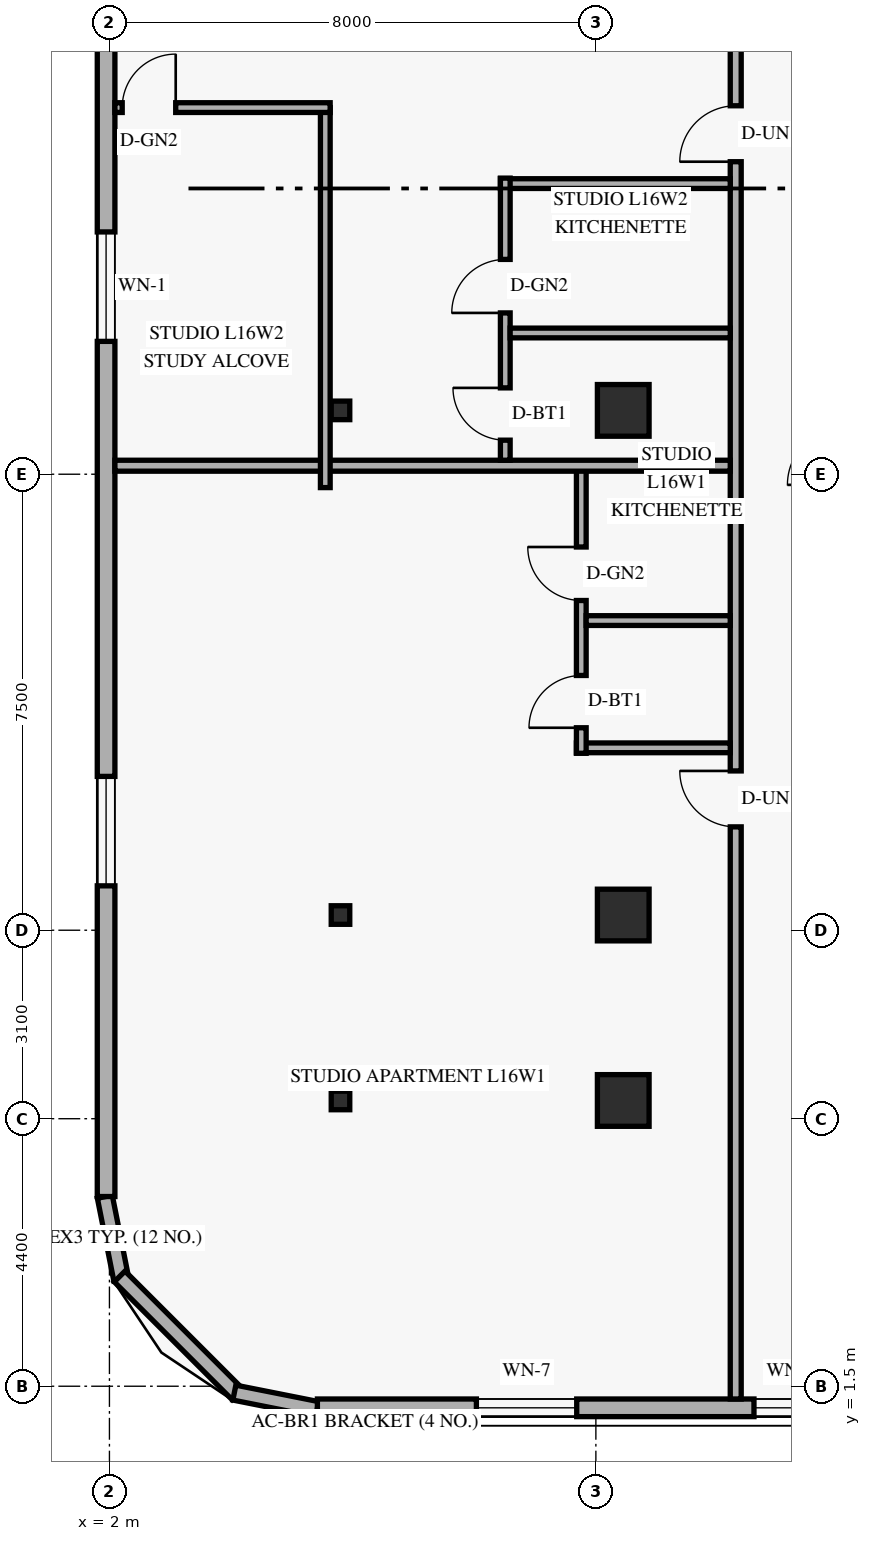
"""IFC4 building model, lengths in metres.
Left out: names, types, materials, properties, quantities, classifications, styles, units other than length and angle.
Written with IfcOpenShell. Run it as: python <this file> out.ifc"""

import sys

from ifc_helpers import new_model, si_unit, direction, frame, frame_2d, origin, origin_2d, place, context, subcontext, project, spatial, rectangle, hollow_rectangle, extrude, element, fill, save


model = new_model("IFC4")
c1 = context("Model", 3, precision=1e-05, world=origin(), true_north=direction((0.0, 1.0)))
c2 = subcontext(c1, "Body", "Model", "MODEL_VIEW")
j1 = project(units=[si_unit("LENGTHUNIT", "METRE"), si_unit("PLANEANGLEUNIT", "RADIAN")], contexts=[c1])
p1 = place(None, origin())
s1 = spatial("IfcSite", under=j1, at=p1, CompositionType="ELEMENT")
p2 = place(p1, origin())
s2 = spatial("IfcBuilding", under=s1, at=p2, CompositionType="ELEMENT")
p3 = place(p2, frame((0.0, 0.0, 64.2)))
s3 = spatial("IfcBuildingStorey", under=s2, at=p3, CompositionType="ELEMENT", Elevation=64.2)
for number, where, z_axis, x_axis in (
    (1, (5.8, 6.2, 0.0), (0.0, 0.0, 1.0), (1.0, 0.0, 0.0)),
    (2, (5.8, 9.25, 0.0), (0.0, 0.0, 1.0), (1.0, 0.0, 0.0)),
    (3, (5.8, 17.55, 0.0), (0.0, 0.0, 1.0), (1.0, 0.0, 0.0)),
):
    element("IfcColumn", number, at=place(p3, frame(where, z_axis=z_axis, x_axis=x_axis)), inside=s3, PredefinedType="COLUMN", context=c2, shape_type="SweptSolid", body=[
        extrude(hollow_rectangle(XDim=0.305, YDim=0.305, WallThickness=0.013, at=origin_2d()), origin(), (0.0, 0.0, 1.0), 3.6),
    ])
for number, where, z_axis, x_axis in (
    (4, (10.45, 6.2, 0.0), (0.0, 0.0, 1.0), (1.0, 0.0, 0.0)),
    (5, (10.45, 9.25, 0.0), (0.0, 0.0, 1.0), (1.0, 0.0, 0.0)),
    (6, (10.45, 17.55, 0.0), (0.0, 0.0, 1.0), (1.0, 0.0, 0.0)),
):
    element("IfcColumn", number, at=place(p3, frame(where, z_axis=z_axis, x_axis=x_axis)), inside=s3, PredefinedType="COLUMN", context=c2, shape_type="SweptSolid", body=[
        extrude(rectangle(XDim=0.85, YDim=0.85, at=origin_2d()), origin(), (0.0, 0.0, 1.0), 3.6),
    ])
p4 = place(p3, frame((1.924, 4.616, 0.0), z_axis=(0.0, 0.0, 1.0), x_axis=(0.19496651342, -0.980809899341, 0.0)))
e7 = element("IfcWall", 7, at=p4, inside=s3, PredefinedType="SOLIDWALL", context=c2, shape_type="SweptSolid", body=[
    extrude(rectangle(XDim=1.389, YDim=0.25, at=frame_2d((0.694, 0.0))), origin(), (0.0, 0.0, 1.0), 3.36),
])
p5 = place(p3, frame((2.168, 3.305, 0.0), z_axis=(0.0, 0.0, 1.0), x_axis=(0.707106781187, -0.707106781187, 0.0)))
e8 = element("IfcWall", 8, at=p5, inside=s3, PredefinedType="SOLIDWALL", context=c2, shape_type="SweptSolid", body=[
    extrude(rectangle(XDim=2.739, YDim=0.25, at=frame_2d((1.37, 0.0))), origin(), (0.0, 0.0, 1.0), 3.36),
])
p6 = place(p3, frame((4.054, 1.395, 0.0), z_axis=(0.0, 0.0, 1.0), x_axis=(0.980809899341, -0.19496651342, 0.0)))
e9 = element("IfcWall", 9, at=p6, inside=s3, PredefinedType="SOLIDWALL", context=c2, shape_type="SweptSolid", body=[
    extrude(rectangle(XDim=1.389, YDim=0.25, at=frame_2d((0.694, 0.0))), origin(), (0.0, 0.0, 1.0), 3.36),
])
p7 = place(p3, frame((5.42, 1.145, 0.0), z_axis=(0.0, 0.0, 1.0), x_axis=(1.0, 0.0, 0.0)))
e10 = element("IfcWall", 10, at=p7, inside=s3, PredefinedType="SOLIDWALL", context=c2, shape_type="SweptSolid", body=[
    extrude(rectangle(XDim=39.56, YDim=0.29, at=frame_2d((19.78, 0.0))), origin(), (0.0, 0.0, 1.0), 3.36),
])
p8 = place(p7, frame((2.615, 0.0, 0.85)))
e11 = element("IfcOpeningElement", 11, at=p8, cuts=e10, PredefinedType="OPENING", context=c2, shape_type="SweptSolid", body=[
    extrude(rectangle(XDim=1.65, YDim=1.6, at=frame_2d((0.825, 0.8))), frame((0.0, 0.155, 0.0), z_axis=(0.0, -1.0, 0.0), x_axis=(1.0, 0.0, 0.0)), (0.0, 0.0, 1.0), 0.31),
])
p9 = place(p7, frame((7.18, 0.0, 0.85)))
e12 = element("IfcOpeningElement", 12, at=p9, cuts=e10, PredefinedType="OPENING", context=c2, shape_type="SweptSolid", body=[
    extrude(rectangle(XDim=1.2, YDim=1.5, at=frame_2d((0.6, 0.75))), frame((0.0, 0.155, 0.0), z_axis=(0.0, -1.0, 0.0), x_axis=(1.0, 0.0, 0.0)), (0.0, 0.0, 1.0), 0.31),
])
p10 = place(p7, frame((11.906, 0.0, 0.85)))
e13 = element("IfcOpeningElement", 13, at=p10, cuts=e10, PredefinedType="OPENING", context=c2, shape_type="SweptSolid", body=[
    extrude(rectangle(XDim=1.65, YDim=1.6, at=frame_2d((0.825, 0.8))), frame((0.0, 0.155, 0.0), z_axis=(0.0, -1.0, 0.0), x_axis=(1.0, 0.0, 0.0)), (0.0, 0.0, 1.0), 0.31),
])
p11 = place(p7, frame((18.515, 0.0, 0.85)))
e14 = element("IfcOpeningElement", 14, at=p11, cuts=e10, PredefinedType="OPENING", context=c2, shape_type="SweptSolid", body=[
    extrude(rectangle(XDim=1.65, YDim=1.6, at=frame_2d((0.825, 0.8))), frame((0.0, 0.155, 0.0), z_axis=(0.0, -1.0, 0.0), x_axis=(1.0, 0.0, 0.0)), (0.0, 0.0, 1.0), 0.31),
])
p12 = place(p7, frame((25.124, 0.0, 0.85)))
e15 = element("IfcOpeningElement", 15, at=p12, cuts=e10, PredefinedType="OPENING", context=c2, shape_type="SweptSolid", body=[
    extrude(rectangle(XDim=1.65, YDim=1.6, at=frame_2d((0.825, 0.8))), frame((0.0, 0.155, 0.0), z_axis=(0.0, -1.0, 0.0), x_axis=(1.0, 0.0, 0.0)), (0.0, 0.0, 1.0), 0.31),
])
p13 = place(p7, frame((30.465, 0.0, 0.85)))
e16 = element("IfcOpeningElement", 16, at=p13, cuts=e10, PredefinedType="OPENING", context=c2, shape_type="SweptSolid", body=[
    extrude(rectangle(XDim=1.2, YDim=1.5, at=frame_2d((0.6, 0.75))), frame((0.0, 0.155, 0.0), z_axis=(0.0, -1.0, 0.0), x_axis=(1.0, 0.0, 0.0)), (0.0, 0.0, 1.0), 0.31),
])
p14 = place(p7, frame((35.02, 0.0, 0.85)))
e17 = element("IfcOpeningElement", 17, at=p14, cuts=e10, PredefinedType="OPENING", context=c2, shape_type="SweptSolid", body=[
    extrude(rectangle(XDim=1.65, YDim=1.6, at=frame_2d((0.825, 0.8))), frame((0.0, 0.155, 0.0), z_axis=(0.0, -1.0, 0.0), x_axis=(1.0, 0.0, 0.0)), (0.0, 0.0, 1.0), 0.31),
])
p15 = place(p3, frame((1.945, 43.38, 0.0), z_axis=(0.0, 0.0, 1.0), x_axis=(0.0, -1.0, 0.0)))
e18 = element("IfcWall", 18, at=p15, inside=s3, PredefinedType="SOLIDWALL", context=c2, shape_type="SweptSolid", body=[
    extrude(rectangle(XDim=38.76, YDim=0.29, at=frame_2d((19.38, 0.0))), origin(), (0.0, 0.0, 1.0), 3.36),
])
p16 = place(p15, frame((31.85, 0.0, 0.85)))
e19 = element("IfcOpeningElement", 19, at=p16, cuts=e18, PredefinedType="OPENING", context=c2, shape_type="SweptSolid", body=[
    extrude(rectangle(XDim=1.8, YDim=1.6, at=frame_2d((0.9, 0.8))), frame((0.0, 0.155, 0.0), z_axis=(0.0, -1.0, 0.0), x_axis=(1.0, 0.0, 0.0)), (0.0, 0.0, 1.0), 0.31),
])
p17 = place(p15, frame((22.895, 0.0, 0.85)))
e20 = element("IfcOpeningElement", 20, at=p17, cuts=e18, PredefinedType="OPENING", context=c2, shape_type="SweptSolid", body=[
    extrude(rectangle(XDim=1.8, YDim=1.6, at=frame_2d((0.9, 0.8))), frame((0.0, 0.155, 0.0), z_axis=(0.0, -1.0, 0.0), x_axis=(1.0, 0.0, 0.0)), (0.0, 0.0, 1.0), 0.31),
])
p18 = place(p15, frame((15.075, 0.0, 0.85)))
e21 = element("IfcOpeningElement", 21, at=p18, cuts=e18, PredefinedType="OPENING", context=c2, shape_type="SweptSolid", body=[
    extrude(rectangle(XDim=1.8, YDim=1.6, at=frame_2d((0.9, 0.8))), frame((0.0, 0.155, 0.0), z_axis=(0.0, -1.0, 0.0), x_axis=(1.0, 0.0, 0.0)), (0.0, 0.0, 1.0), 0.31),
])
p19 = place(p15, frame((7.255, 0.0, 0.85)))
e22 = element("IfcOpeningElement", 22, at=p19, cuts=e18, PredefinedType="OPENING", context=c2, shape_type="SweptSolid", body=[
    extrude(rectangle(XDim=1.8, YDim=1.6, at=frame_2d((0.9, 0.8))), frame((0.0, 0.155, 0.0), z_axis=(0.0, -1.0, 0.0), x_axis=(1.0, 0.0, 0.0)), (0.0, 0.0, 1.0), 0.31),
])
p20 = place(p15, frame((1.705, 0.0, 0.85)))
e23 = element("IfcOpeningElement", 23, at=p20, cuts=e18, PredefinedType="OPENING", context=c2, shape_type="SweptSolid", body=[
    extrude(rectangle(XDim=1.8, YDim=1.6, at=frame_2d((0.9, 0.8))), frame((0.0, 0.155, 0.0), z_axis=(0.0, -1.0, 0.0), x_axis=(1.0, 0.0, 0.0)), (0.0, 0.0, 1.0), 0.31),
])
p21 = place(p3, frame((12.3, 1.29, 0.0), z_axis=(0.0, 0.0, 1.0), x_axis=(0.0, 1.0, 0.0)))
e24 = element("IfcWall", 24, at=p21, inside=s3, PredefinedType="STANDARD", context=c2, shape_type="SweptSolid", body=[
    extrude(rectangle(XDim=45.42, YDim=0.18, at=frame_2d((22.71, 0.0))), origin(), (0.0, 0.0, 1.0), 2.649),
])
p22 = place(p21, frame((9.41, 0.0, 0.0)))
e25 = element("IfcOpeningElement", 25, at=p22, cuts=e24, PredefinedType="OPENING", context=c2, shape_type="SweptSolid", body=[
    extrude(rectangle(XDim=0.92, YDim=2.15, at=frame_2d((0.46, 1.075))), frame((0.0, 0.1, 0.0), z_axis=(0.0, -1.0, 0.0), x_axis=(1.0, 0.0, 0.0)), (0.0, 0.0, 1.0), 0.2),
])
p23 = place(p21, frame((20.35, 0.0, 0.0)))
e26 = element("IfcOpeningElement", 26, at=p23, cuts=e24, PredefinedType="OPENING", context=c2, shape_type="SweptSolid", body=[
    extrude(rectangle(XDim=0.92, YDim=2.15, at=frame_2d((0.46, 1.075))), frame((0.0, 0.1, 0.0), z_axis=(0.0, -1.0, 0.0), x_axis=(1.0, 0.0, 0.0)), (0.0, 0.0, 1.0), 0.2),
])
p24 = place(p21, frame((35.99, 0.0, 0.0)))
e27 = element("IfcOpeningElement", 27, at=p24, cuts=e24, PredefinedType="OPENING", context=c2, shape_type="SweptSolid", body=[
    extrude(rectangle(XDim=0.92, YDim=2.15, at=frame_2d((0.46, 1.075))), frame((0.0, 0.1, 0.0), z_axis=(0.0, -1.0, 0.0), x_axis=(1.0, 0.0, 0.0)), (0.0, 0.0, 1.0), 0.2),
])
p25 = place(p3, frame((9.68, 12.0, 0.0), z_axis=(0.0, 0.0, 1.0), x_axis=(1.0, 0.0, 0.0)))
e28 = element("IfcWall", 28, at=p25, inside=s3, PredefinedType="PLUMBINGWALL", context=c2, shape_type="SweptSolid", body=[
    extrude(rectangle(XDim=2.53, YDim=0.16, at=frame_2d((1.265, 0.0))), origin(), (0.0, 0.0, 1.0), 2.649),
])
p26 = place(p3, frame((9.76, 11.91, 0.0), z_axis=(0.0, 0.0, 1.0), x_axis=(0.0, 1.0, 0.0)))
e29 = element("IfcWall", 29, at=p26, inside=s3, PredefinedType="PLUMBINGWALL", context=c2, shape_type="SweptSolid", body=[
    extrude(rectangle(XDim=4.73, YDim=0.16, at=frame_2d((2.365, 0.0))), origin(), (0.0, 0.0, 1.0), 2.932),
])
p27 = place(p26, frame((0.42, 0.0, 0.0)))
e30 = element("IfcOpeningElement", 30, at=p27, cuts=e29, PredefinedType="OPENING", context=c2, shape_type="SweptSolid", body=[
    extrude(rectangle(XDim=0.86, YDim=2.12, at=frame_2d((0.43, 1.06))), frame((0.0, 0.09, 0.0), z_axis=(0.0, -1.0, 0.0), x_axis=(1.0, 0.0, 0.0)), (0.0, 0.0, 1.0), 0.18),
])
p28 = place(p26, frame((2.513, 0.0, 0.0)))
e31 = element("IfcOpeningElement", 31, at=p28, cuts=e29, PredefinedType="OPENING", context=c2, shape_type="SweptSolid", body=[
    extrude(rectangle(XDim=0.88, YDim=2.12, at=frame_2d((0.44, 1.06))), frame((0.0, 0.09, 0.0), z_axis=(0.0, -1.0, 0.0), x_axis=(1.0, 0.0, 0.0)), (0.0, 0.0, 1.0), 0.18),
])
p29 = place(p3, frame((9.84, 14.093, 0.0), z_axis=(0.0, 0.0, 1.0), x_axis=(1.0, 0.0, 0.0)))
e32 = element("IfcWall", 32, at=p29, inside=s3, PredefinedType="PLUMBINGWALL", context=c2, shape_type="SweptSolid", body=[
    extrude(rectangle(XDim=2.37, YDim=0.16, at=frame_2d((1.185, 0.0))), origin(), (0.0, 0.0, 1.0), 2.649),
])
p30 = place(p3, frame((2.09, 16.64, 0.0), z_axis=(0.0, 0.0, 1.0), x_axis=(1.0, 0.0, 0.0)))
e33 = element("IfcWall", 33, at=p30, inside=s3, PredefinedType="PARTITIONING", context=c2, shape_type="SweptSolid", body=[
    extrude(rectangle(XDim=10.12, YDim=0.18, at=frame_2d((5.06, 0.0))), origin(), (0.0, 0.0, 1.0), 2.649),
])
p31 = place(p3, frame((8.43, 21.28, 0.0), z_axis=(0.0, 0.0, 1.0), x_axis=(1.0, 0.0, 0.0)))
e34 = element("IfcWall", 34, at=p31, inside=s3, PredefinedType="PLUMBINGWALL", context=c2, shape_type="SweptSolid", body=[
    extrude(rectangle(XDim=3.78, YDim=0.16, at=frame_2d((1.89, 0.0))), origin(), (0.0, 0.0, 1.0), 2.649),
])
p32 = place(p3, frame((8.51, 16.73, 0.0), z_axis=(0.0, 0.0, 1.0), x_axis=(0.0, 1.0, 0.0)))
e35 = element("IfcWall", 35, at=p32, inside=s3, PredefinedType="PLUMBINGWALL", context=c2, shape_type="SweptSolid", body=[
    extrude(rectangle(XDim=4.64, YDim=0.16, at=frame_2d((2.32, 0.0))), origin(), (0.0, 0.0, 1.0), 2.649),
])
p33 = place(p32, frame((0.33, 0.0, 0.0)))
e36 = element("IfcOpeningElement", 36, at=p33, cuts=e35, PredefinedType="OPENING", context=c2, shape_type="SweptSolid", body=[
    extrude(rectangle(XDim=0.86, YDim=2.12, at=frame_2d((0.43, 1.06))), frame((0.0, 0.09, 0.0), z_axis=(0.0, -1.0, 0.0), x_axis=(1.0, 0.0, 0.0)), (0.0, 0.0, 1.0), 0.18),
])
p34 = place(p32, frame((2.423, 0.0, 0.0)))
e37 = element("IfcOpeningElement", 37, at=p34, cuts=e35, PredefinedType="OPENING", context=c2, shape_type="SweptSolid", body=[
    extrude(rectangle(XDim=0.88, YDim=2.12, at=frame_2d((0.44, 1.06))), frame((0.0, 0.09, 0.0), z_axis=(0.0, -1.0, 0.0), x_axis=(1.0, 0.0, 0.0)), (0.0, 0.0, 1.0), 0.18),
])
p35 = place(p3, frame((8.59, 18.823, 0.0), z_axis=(0.0, 0.0, 1.0), x_axis=(1.0, 0.0, 0.0)))
e38 = element("IfcWall", 38, at=p35, inside=s3, PredefinedType="PLUMBINGWALL", context=c2, shape_type="SweptSolid", body=[
    extrude(rectangle(XDim=3.62, YDim=0.16, at=frame_2d((1.81, 0.0))), origin(), (0.0, 0.0, 1.0), 2.649),
])
p36 = place(p3, frame((5.55, 16.28, 0.0), z_axis=(0.0, 0.0, 1.0), x_axis=(0.0, 1.0, 0.0)))
e39 = element("IfcWall", 39, at=p36, inside=s3, PredefinedType="PARTITIONING", context=c2, shape_type="SweptSolid", body=[
    extrude(rectangle(XDim=6.25, YDim=0.16, at=frame_2d((3.125, 0.0))), origin(), (0.0, 0.0, 1.0), 3.36),
])
p37 = place(p3, frame((2.09, 22.53, 0.0), z_axis=(0.0, 0.0, 1.0), x_axis=(1.0, 0.0, 0.0)))
e40 = element("IfcWall", 40, at=p37, inside=s3, PredefinedType="PARTITIONING", context=c2, shape_type="SweptSolid", body=[
    extrude(rectangle(XDim=3.54, YDim=0.16, at=frame_2d((1.77, 0.0))), origin(), (0.0, 0.0, 1.0), 3.36),
])
p38 = place(p37, frame((0.12, 0.0, 0.0)))
e41 = element("IfcOpeningElement", 41, at=p38, cuts=e40, PredefinedType="OPENING", context=c2, shape_type="SweptSolid", body=[
    extrude(rectangle(XDim=0.88, YDim=2.12, at=frame_2d((0.44, 1.06))), frame((0.0, 0.09, 0.0), z_axis=(0.0, -1.0, 0.0), x_axis=(1.0, 0.0, 0.0)), (0.0, 0.0, 1.0), 0.18),
])
p39 = place(p8, origin())
e42 = element("IfcWindow", 42, at=p39, inside=s3, PartitioningType="SINGLE_PANEL", PredefinedType="WINDOW", context=c2, shape_type="SweptSolid", body=[
    extrude(rectangle(XDim=1.65, YDim=1.6, at=frame_2d((0.825, 0.8))), frame((0.0, 0.03, 0.0), z_axis=(0.0, -1.0, 0.0), x_axis=(1.0, 0.0, 0.0)), (0.0, 0.0, 1.0), 0.06),
])
fill(e11, e42)
p40 = place(p9, origin())
e43 = element("IfcWindow", 43, at=p40, inside=s3, PartitioningType="SINGLE_PANEL", PredefinedType="WINDOW", context=c2, shape_type="SweptSolid", body=[
    extrude(rectangle(XDim=1.2, YDim=1.5, at=frame_2d((0.6, 0.75))), frame((0.0, 0.03, 0.0), z_axis=(0.0, -1.0, 0.0), x_axis=(1.0, 0.0, 0.0)), (0.0, 0.0, 1.0), 0.06),
])
fill(e12, e43)
p41 = place(p16, origin())
e44 = element("IfcWindow", 44, at=p41, inside=s3, PartitioningType="SINGLE_PANEL", PredefinedType="WINDOW", context=c2, shape_type="SweptSolid", body=[
    extrude(rectangle(XDim=1.8, YDim=1.6, at=frame_2d((0.9, 0.8))), frame((0.0, 0.03, 0.0), z_axis=(0.0, -1.0, 0.0), x_axis=(1.0, 0.0, 0.0)), (0.0, 0.0, 1.0), 0.06),
])
fill(e19, e44)
p42 = place(p17, origin())
e45 = element("IfcWindow", 45, at=p42, inside=s3, PartitioningType="SINGLE_PANEL", PredefinedType="WINDOW", context=c2, shape_type="SweptSolid", body=[
    extrude(rectangle(XDim=1.8, YDim=1.6, at=frame_2d((0.9, 0.8))), frame((0.0, 0.03, 0.0), z_axis=(0.0, -1.0, 0.0), x_axis=(1.0, 0.0, 0.0)), (0.0, 0.0, 1.0), 0.06),
])
fill(e20, e45)
p43 = place(p22, origin())
e46 = element("IfcDoor", 46, at=p43, inside=s3, OperationType="SINGLE_SWING_RIGHT", PredefinedType="DOOR", context=c2, shape_type="SweptSolid", body=[
    extrude(rectangle(XDim=0.92, YDim=2.15, at=frame_2d((0.46, 1.075))), frame((0.0, 0.025, 0.0), z_axis=(0.0, -1.0, 0.0), x_axis=(1.0, 0.0, 0.0)), (0.0, 0.0, 1.0), 0.05),
])
fill(e25, e46)
p44 = place(p27, origin())
e47 = element("IfcDoor", 47, at=p44, inside=s3, OperationType="SINGLE_SWING_LEFT", PredefinedType="DOOR", context=c2, shape_type="SweptSolid", body=[
    extrude(rectangle(XDim=0.86, YDim=2.12, at=frame_2d((0.43, 1.06))), frame((0.0, 0.025, 0.0), z_axis=(0.0, -1.0, 0.0), x_axis=(1.0, 0.0, 0.0)), (0.0, 0.0, 1.0), 0.05),
])
fill(e30, e47)
p45 = place(p28, origin())
e48 = element("IfcDoor", 48, at=p45, inside=s3, OperationType="SINGLE_SWING_RIGHT", PredefinedType="DOOR", context=c2, shape_type="SweptSolid", body=[
    extrude(rectangle(XDim=0.88, YDim=2.12, at=frame_2d((0.44, 1.06))), frame((0.0, 0.025, 0.0), z_axis=(0.0, -1.0, 0.0), x_axis=(1.0, 0.0, 0.0)), (0.0, 0.0, 1.0), 0.05),
])
fill(e31, e48)
p46 = place(p38, origin())
e49 = element("IfcDoor", 49, at=p46, inside=s3, OperationType="SINGLE_SWING_RIGHT", PredefinedType="DOOR", context=c2, shape_type="SweptSolid", body=[
    extrude(rectangle(XDim=0.88, YDim=2.12, at=frame_2d((0.44, 1.06))), frame((0.0, 0.025, 0.0), z_axis=(0.0, -1.0, 0.0), x_axis=(1.0, 0.0, 0.0)), (0.0, 0.0, 1.0), 0.05),
])
fill(e41, e49)
p47 = place(p23, origin())
e50 = element("IfcDoor", 50, at=p47, inside=s3, OperationType="SINGLE_SWING_LEFT", PredefinedType="DOOR", context=c2, shape_type="SweptSolid", body=[
    extrude(rectangle(XDim=0.92, YDim=2.15, at=frame_2d((0.46, 1.075))), frame((0.0, 0.025, 0.0), z_axis=(0.0, -1.0, 0.0), x_axis=(1.0, 0.0, 0.0)), (0.0, 0.0, 1.0), 0.05),
])
fill(e26, e50)
p48 = place(p33, origin())
e51 = element("IfcDoor", 51, at=p48, inside=s3, OperationType="SINGLE_SWING_RIGHT", PredefinedType="DOOR", context=c2, shape_type="SweptSolid", body=[
    extrude(rectangle(XDim=0.86, YDim=2.12, at=frame_2d((0.43, 1.06))), frame((0.0, 0.025, 0.0), z_axis=(0.0, -1.0, 0.0), x_axis=(1.0, 0.0, 0.0)), (0.0, 0.0, 1.0), 0.05),
])
fill(e36, e51)
p49 = place(p34, origin())
e52 = element("IfcDoor", 52, at=p49, inside=s3, OperationType="SINGLE_SWING_LEFT", PredefinedType="DOOR", context=c2, shape_type="SweptSolid", body=[
    extrude(rectangle(XDim=0.88, YDim=2.12, at=frame_2d((0.44, 1.06))), frame((0.0, 0.025, 0.0), z_axis=(0.0, -1.0, 0.0), x_axis=(1.0, 0.0, 0.0)), (0.0, 0.0, 1.0), 0.05),
])
fill(e37, e52)
save(model, sys.argv[1])
